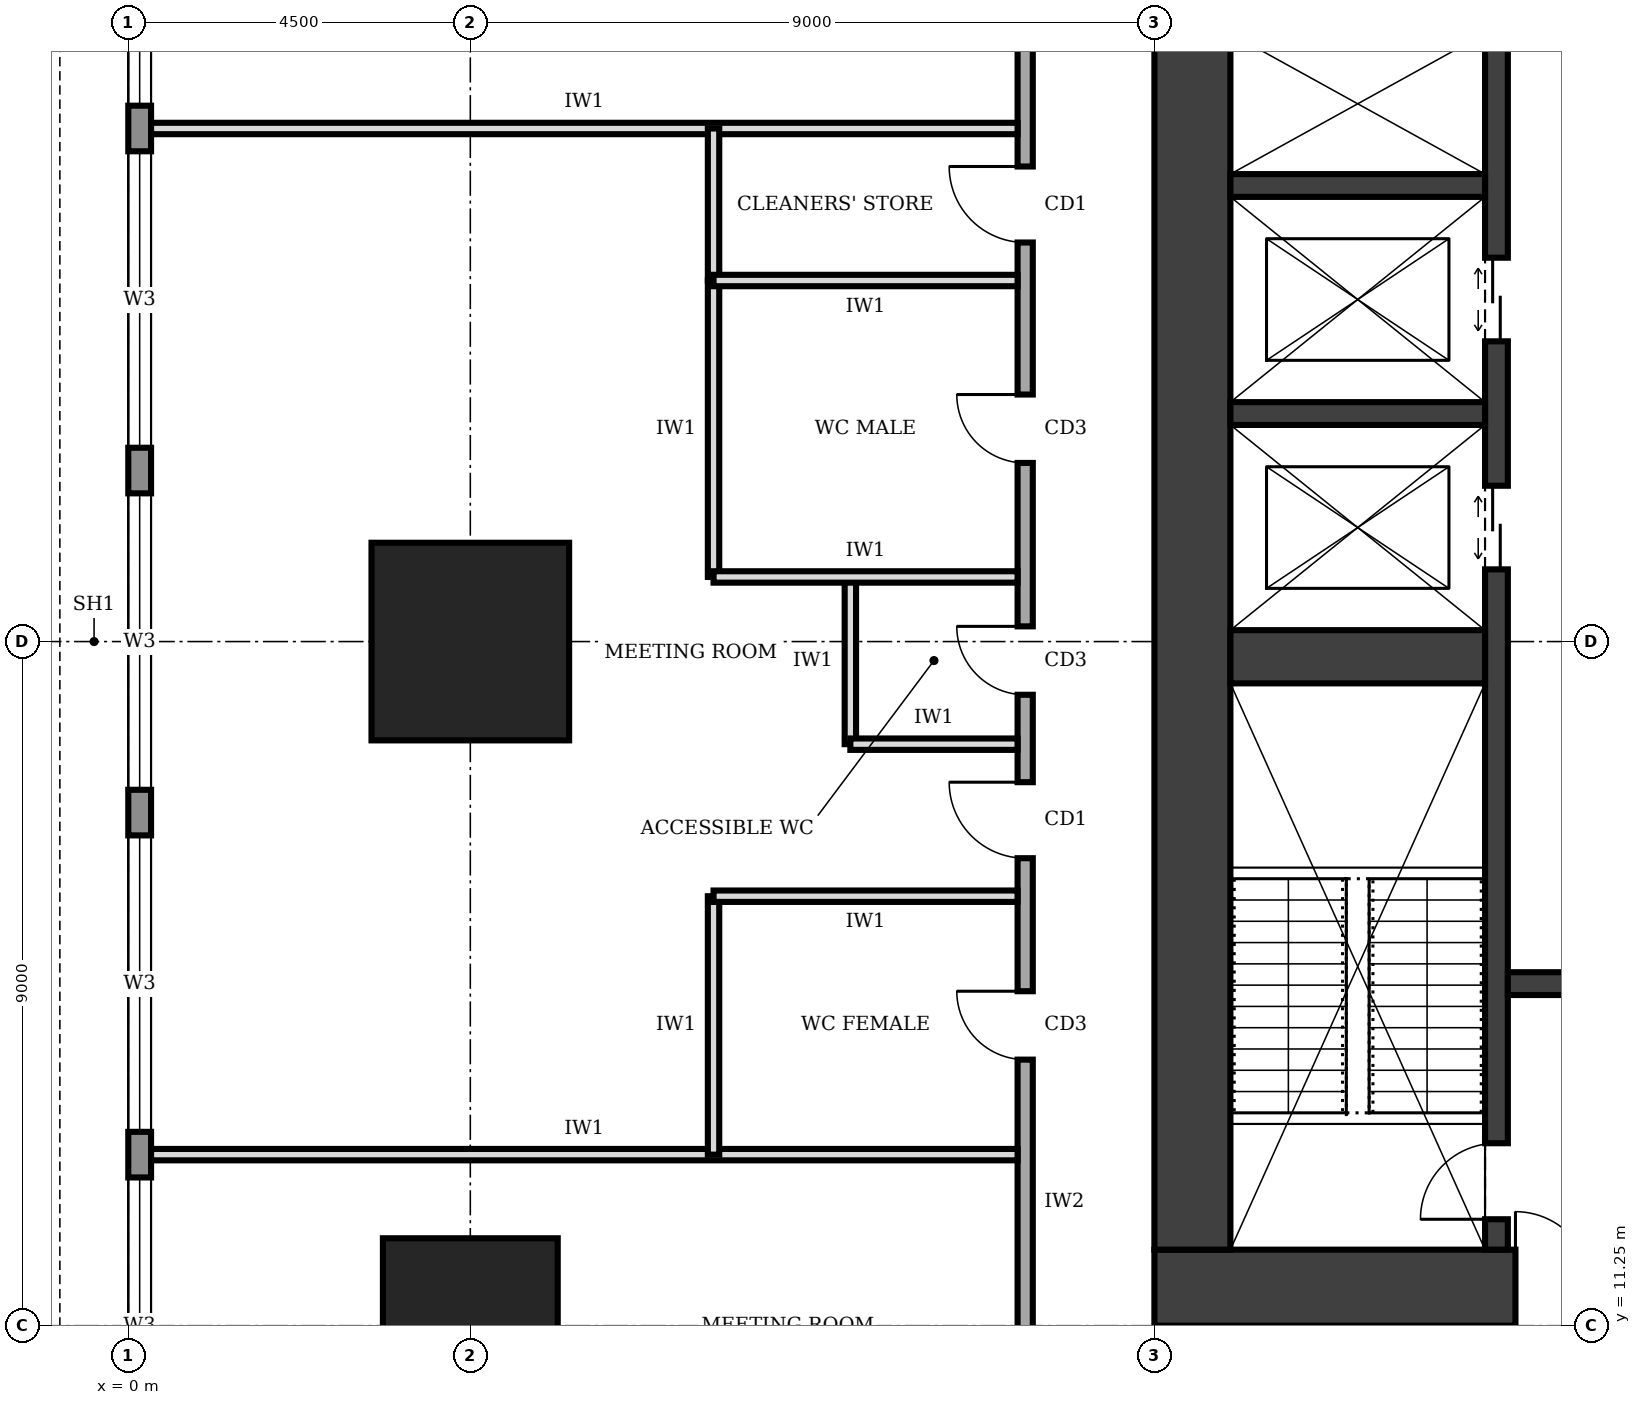
"""IFC4 building model, lengths in metres.
Left out: names, types, materials, properties, quantities, classifications, styles, units other than length and angle.
Written with IfcOpenShell. Run it as: python <this file> out.ifc"""

import sys

from ifc_helpers import new_model, si_unit, direction, frame, frame_2d, origin, origin_2d, place, context, subcontext, project, spatial, rectangle, extrude, element, fill, save


model = new_model("IFC4")
c1 = context("Model", 3, precision=1e-05, world=origin(), true_north=direction((0.0, 1.0)))
c2 = subcontext(c1, "Body", "Model", "MODEL_VIEW")
j1 = project(units=[si_unit("LENGTHUNIT", "METRE"), si_unit("PLANEANGLEUNIT", "RADIAN")], contexts=[c1])
p1 = place(None, origin())
s1 = spatial("IfcSite", under=j1, at=p1, CompositionType="ELEMENT")
p2 = place(p1, origin())
s2 = spatial("IfcBuilding", under=s1, at=p2, CompositionType="ELEMENT")
p3 = place(p2, frame((0.0, 0.0, 85.0)))
s3 = spatial("IfcBuildingStorey", under=s2, at=p3, CompositionType="ELEMENT", Elevation=85.0)
p4 = place(p3, frame((13.5, 11.75, 0.0), z_axis=(0.0, 0.0, 1.0), x_axis=(1.0, 0.0, 0.0)))
e1 = element("IfcWall", 1, at=p4, inside=s3, PredefinedType="SHEAR", context=c2, shape_type="SweptSolid", body=[
    extrude(rectangle(XDim=13.5, YDim=1.0, at=frame_2d((6.75, 0.0))), origin(), (0.0, 0.0, 1.0), 4.0),
])
p5 = place(p4, frame((4.75, 0.0, 0.0)))
e2 = element("IfcOpeningElement", 2, at=p5, cuts=e1, PredefinedType="OPENING", context=c2, shape_type="SweptSolid", body=[
    extrude(rectangle(XDim=1.0, YDim=2.1, at=frame_2d((0.5, 1.05))), frame((0.0, 0.51, 0.0), z_axis=(0.0, -1.0, 0.0), x_axis=(1.0, 0.0, 0.0)), (0.0, 0.0, 1.0), 1.02),
])
p6 = place(p3, frame((14.0, 28.25, 0.0), z_axis=(0.0, 0.0, 1.0), x_axis=(0.0, -1.0, 0.0)))
e3 = element("IfcWall", 3, at=p6, inside=s3, PredefinedType="SHEAR", context=c2, shape_type="SweptSolid", body=[
    extrude(rectangle(XDim=16.0, YDim=1.0, at=frame_2d((8.0, 0.0))), origin(), (0.0, 0.0, 1.0), 4.0),
])
p7 = place(p3, frame((18.0, 12.25, 0.0), z_axis=(0.0, 0.0, 1.0), x_axis=(0.0, 1.0, 0.0)))
e4 = element("IfcWall", 4, at=p7, inside=s3, PredefinedType="SHEAR", context=c2, shape_type="SweptSolid", body=[
    extrude(rectangle(XDim=16.0, YDim=0.3, at=frame_2d((8.0, 0.0))), origin(), (0.0, 0.0, 1.0), 4.0),
])
p8 = place(p7, frame((0.4, 0.0, 0.0)))
e5 = element("IfcOpeningElement", 5, at=p8, cuts=e4, PredefinedType="OPENING", context=c2, shape_type="SweptSolid", body=[
    extrude(rectangle(XDim=1.0, YDim=2.1, at=frame_2d((0.5, 1.05))), frame((0.0, 0.16, 0.0), z_axis=(0.0, -1.0, 0.0), x_axis=(1.0, 0.0, 0.0)), (0.0, 0.0, 1.0), 0.32),
])
p9 = place(p7, frame((8.95, 0.0, 0.0)))
e6 = element("IfcOpeningElement", 6, at=p9, cuts=e4, PredefinedType="OPENING", context=c2, shape_type="SweptSolid", body=[
    extrude(rectangle(XDim=1.1, YDim=2.1, at=frame_2d((0.55, 1.05))), frame((0.0, 0.16, 0.0), z_axis=(0.0, -1.0, 0.0), x_axis=(1.0, 0.0, 0.0)), (0.0, 0.0, 1.0), 0.32),
])
p10 = place(p7, frame((11.95, 0.0, 0.0)))
e7 = element("IfcOpeningElement", 7, at=p10, cuts=e4, PredefinedType="OPENING", context=c2, shape_type="SweptSolid", body=[
    extrude(rectangle(XDim=1.1, YDim=2.1, at=frame_2d((0.55, 1.05))), frame((0.0, 0.16, 0.0), z_axis=(0.0, -1.0, 0.0), x_axis=(1.0, 0.0, 0.0)), (0.0, 0.0, 1.0), 0.32),
])
p11 = place(p3, frame((14.5, 20.05, 0.0), z_axis=(0.0, 0.0, 1.0), x_axis=(1.0, 0.0, 0.0)))
e8 = element("IfcWall", 8, at=p11, inside=s3, PredefinedType="SHEAR", context=c2, shape_type="SweptSolid", body=[
    extrude(rectangle(XDim=3.35, YDim=0.7, at=frame_2d((1.675, 0.0))), origin(), (0.0, 0.0, 1.0), 4.0),
])
p12 = place(p3, frame((18.15, 15.75, 0.0), z_axis=(0.0, 0.0, 1.0), x_axis=(1.0, 0.0, 0.0)))
e9 = element("IfcWall", 9, at=p12, inside=s3, PredefinedType="SHEAR", context=c2, shape_type="SweptSolid", body=[
    extrude(rectangle(XDim=4.2, YDim=0.3, at=frame_2d((2.1, 0.0))), origin(), (0.0, 0.0, 1.0), 4.0),
])
p13 = place(p12, frame((1.6, 0.0, 0.0)))
e10 = element("IfcOpeningElement", 10, at=p13, cuts=e9, PredefinedType="OPENING", context=c2, shape_type="SweptSolid", body=[
    extrude(rectangle(XDim=1.0, YDim=2.1, at=frame_2d((0.5, 1.05))), frame((0.0, 0.16, 0.0), z_axis=(0.0, -1.0, 0.0), x_axis=(1.0, 0.0, 0.0)), (0.0, 0.0, 1.0), 0.32),
])
for number, where, z_axis, x_axis in (
    (11, (14.5, 23.25, 0.0), (0.0, 0.0, 1.0), (1.0, 0.0, 0.0)),
    (12, (14.5, 26.25, 0.0), (0.0, 0.0, 1.0), (1.0, 0.0, 0.0)),
):
    element("IfcWall", number, at=place(p3, frame(where, z_axis=z_axis, x_axis=x_axis)), inside=s3, PredefinedType="SHEAR", context=c2, shape_type="SweptSolid", body=[
        extrude(rectangle(XDim=3.35, YDim=0.3, at=frame_2d((1.675, 0.0))), origin(), (0.0, 0.0, 1.0), 4.0),
    ])
p14 = place(p3, frame((4.5, 11.25, 0.0), z_axis=(0.0, 0.0, 1.0), x_axis=(1.0, 0.0, 0.0)))
e13 = element("IfcColumn", 13, at=p14, inside=s3, PredefinedType="COLUMN", context=c2, shape_type="SweptSolid", body=[
    extrude(rectangle(XDim=2.3, YDim=2.3, at=origin_2d()), origin(), (0.0, 0.0, 1.0), 4.0),
])
p15 = place(p3, frame((4.5, 20.25, 0.0), z_axis=(0.0, 0.0, 1.0), x_axis=(1.0, 0.0, 0.0)))
e14 = element("IfcColumn", 14, at=p15, inside=s3, PredefinedType="COLUMN", context=c2, shape_type="SweptSolid", body=[
    extrude(rectangle(XDim=2.6, YDim=2.6, at=origin_2d()), origin(), (0.0, 0.0, 1.0), 4.0),
])
p16 = place(p3, frame((0.15, 35.98, 0.0), z_axis=(0.0, 0.0, 1.0), x_axis=(0.0, -1.0, 0.0)))
e15 = element("IfcWall", 15, at=p16, inside=s3, PredefinedType="STANDARD", context=c2, shape_type="SweptSolid", body=[
    extrude(rectangle(XDim=31.46, YDim=0.3, at=frame_2d((15.73, 0.0))), origin(), (0.0, 0.0, 1.0), 3.75),
])
p17 = place(p16, frame((27.28, 0.0, 0.95)))
e16 = element("IfcOpeningElement", 16, at=p17, cuts=e15, PredefinedType="OPENING", context=c2, shape_type="SweptSolid", body=[
    extrude(rectangle(XDim=3.9, YDim=1.8, at=frame_2d((1.95, 0.9))), frame((0.0, 0.16, 0.0), z_axis=(0.0, -1.0, 0.0), x_axis=(1.0, 0.0, 0.0)), (0.0, 0.0, 1.0), 0.32),
])
p18 = place(p16, frame((22.78, 0.0, 0.95)))
e17 = element("IfcOpeningElement", 17, at=p18, cuts=e15, PredefinedType="OPENING", context=c2, shape_type="SweptSolid", body=[
    extrude(rectangle(XDim=3.9, YDim=1.8, at=frame_2d((1.95, 0.9))), frame((0.0, 0.16, 0.0), z_axis=(0.0, -1.0, 0.0), x_axis=(1.0, 0.0, 0.0)), (0.0, 0.0, 1.0), 0.32),
])
p19 = place(p16, frame((18.28, 0.0, 0.95)))
e18 = element("IfcOpeningElement", 18, at=p19, cuts=e15, PredefinedType="OPENING", context=c2, shape_type="SweptSolid", body=[
    extrude(rectangle(XDim=3.9, YDim=1.8, at=frame_2d((1.95, 0.9))), frame((0.0, 0.16, 0.0), z_axis=(0.0, -1.0, 0.0), x_axis=(1.0, 0.0, 0.0)), (0.0, 0.0, 1.0), 0.32),
])
p20 = place(p16, frame((13.78, 0.0, 0.95)))
e19 = element("IfcOpeningElement", 19, at=p20, cuts=e15, PredefinedType="OPENING", context=c2, shape_type="SweptSolid", body=[
    extrude(rectangle(XDim=3.9, YDim=1.8, at=frame_2d((1.95, 0.9))), frame((0.0, 0.16, 0.0), z_axis=(0.0, -1.0, 0.0), x_axis=(1.0, 0.0, 0.0)), (0.0, 0.0, 1.0), 0.32),
])
p21 = place(p16, frame((9.28, 0.0, 0.95)))
e20 = element("IfcOpeningElement", 20, at=p21, cuts=e15, PredefinedType="OPENING", context=c2, shape_type="SweptSolid", body=[
    extrude(rectangle(XDim=3.9, YDim=1.8, at=frame_2d((1.95, 0.9))), frame((0.0, 0.16, 0.0), z_axis=(0.0, -1.0, 0.0), x_axis=(1.0, 0.0, 0.0)), (0.0, 0.0, 1.0), 0.32),
])
p22 = place(p16, frame((4.78, 0.0, 0.95)))
e21 = element("IfcOpeningElement", 21, at=p22, cuts=e15, PredefinedType="OPENING", context=c2, shape_type="SweptSolid", body=[
    extrude(rectangle(XDim=3.9, YDim=1.8, at=frame_2d((1.95, 0.9))), frame((0.0, 0.16, 0.0), z_axis=(0.0, -1.0, 0.0), x_axis=(1.0, 0.0, 0.0)), (0.0, 0.0, 1.0), 0.32),
])
p23 = place(p3, frame((11.8, 32.8, 0.0), z_axis=(0.0, 0.0, 1.0), x_axis=(0.0, -1.0, 0.0)))
e22 = element("IfcWall", 22, at=p23, inside=s3, PredefinedType="SOLIDWALL", context=c2, shape_type="SweptSolid", body=[
    extrude(rectangle(XDim=25.3, YDim=0.2, at=frame_2d((12.65, 0.0))), origin(), (0.0, 0.0, 1.0), 3.75),
])
p24 = place(p23, frame((21.8, 0.0, 0.0)))
e23 = element("IfcOpeningElement", 23, at=p24, cuts=e22, PredefinedType="OPENING", context=c2, shape_type="SweptSolid", body=[
    extrude(rectangle(XDim=1.0, YDim=2.1, at=frame_2d((0.5, 1.05))), frame((0.0, 0.11, 0.0), z_axis=(0.0, -1.0, 0.0), x_axis=(1.0, 0.0, 0.0)), (0.0, 0.0, 1.0), 0.22),
])
p25 = place(p23, frame((17.15, 0.0, 0.0)))
e24 = element("IfcOpeningElement", 24, at=p25, cuts=e22, PredefinedType="OPENING", context=c2, shape_type="SweptSolid", body=[
    extrude(rectangle(XDim=0.9, YDim=2.1, at=frame_2d((0.45, 1.05))), frame((0.0, 0.11, 0.0), z_axis=(0.0, -1.0, 0.0), x_axis=(1.0, 0.0, 0.0)), (0.0, 0.0, 1.0), 0.22),
])
p26 = place(p23, frame((12.35, 0.0, 0.0)))
e25 = element("IfcOpeningElement", 25, at=p26, cuts=e22, PredefinedType="OPENING", context=c2, shape_type="SweptSolid", body=[
    extrude(rectangle(XDim=0.9, YDim=2.1, at=frame_2d((0.45, 1.05))), frame((0.0, 0.11, 0.0), z_axis=(0.0, -1.0, 0.0), x_axis=(1.0, 0.0, 0.0)), (0.0, 0.0, 1.0), 0.22),
])
p27 = place(p23, frame((9.3, 0.0, 0.0)))
e26 = element("IfcOpeningElement", 26, at=p27, cuts=e22, PredefinedType="OPENING", context=c2, shape_type="SweptSolid", body=[
    extrude(rectangle(XDim=0.9, YDim=2.1, at=frame_2d((0.45, 1.05))), frame((0.0, 0.11, 0.0), z_axis=(0.0, -1.0, 0.0), x_axis=(1.0, 0.0, 0.0)), (0.0, 0.0, 1.0), 0.22),
])
p28 = place(p23, frame((6.3, 0.0, 0.0)))
e27 = element("IfcOpeningElement", 27, at=p28, cuts=e22, PredefinedType="OPENING", context=c2, shape_type="SweptSolid", body=[
    extrude(rectangle(XDim=1.0, YDim=2.1, at=frame_2d((0.5, 1.05))), frame((0.0, 0.11, 0.0), z_axis=(0.0, -1.0, 0.0), x_axis=(1.0, 0.0, 0.0)), (0.0, 0.0, 1.0), 0.22),
])
p29 = place(p23, frame((14.4, 0.0, 0.0)))
e28 = element("IfcOpeningElement", 28, at=p29, cuts=e22, PredefinedType="OPENING", context=c2, shape_type="SweptSolid", body=[
    extrude(rectangle(XDim=1.0, YDim=2.1, at=frame_2d((0.5, 1.05))), frame((0.0, 0.11, 0.0), z_axis=(0.0, -1.0, 0.0), x_axis=(1.0, 0.0, 0.0)), (0.0, 0.0, 1.0), 0.22),
])
p30 = place(p23, frame((2.3, 0.0, 0.0)))
e29 = element("IfcOpeningElement", 29, at=p30, cuts=e22, PredefinedType="OPENING", context=c2, shape_type="SweptSolid", body=[
    extrude(rectangle(XDim=1.0, YDim=2.1, at=frame_2d((0.5, 1.05))), frame((0.0, 0.11, 0.0), z_axis=(0.0, -1.0, 0.0), x_axis=(1.0, 0.0, 0.0)), (0.0, 0.0, 1.0), 0.22),
])
for number, where, z_axis, x_axis in (
    (30, (0.3, 13.5, 0.0), (0.0, 0.0, 1.0), (1.0, 0.0, 0.0)),
    (31, (0.3, 27.0, 0.0), (0.0, 0.0, 1.0), (1.0, 0.0, 0.0)),
):
    element("IfcWall", number, at=place(p3, frame(where, z_axis=z_axis, x_axis=x_axis)), inside=s3, PredefinedType="PARTITIONING", context=c2, shape_type="SweptSolid", body=[
        extrude(rectangle(XDim=11.4, YDim=0.15, at=frame_2d((5.7, 0.0))), origin(), (0.0, 0.0, 1.0), 3.75),
    ])
p31 = place(p3, frame((11.7, 16.9, 0.0), z_axis=(0.0, 0.0, 1.0), x_axis=(-1.0, 0.0, 0.0)))
e32 = element("IfcWall", 32, at=p31, inside=s3, PredefinedType="PARTITIONING", context=c2, shape_type="SweptSolid", body=[
    extrude(rectangle(XDim=4.0, YDim=0.15, at=frame_2d((2.0, 0.0))), origin(), (0.0, 0.0, 1.0), 3.75),
])
p32 = place(p3, frame((11.7, 18.9, 0.0), z_axis=(0.0, 0.0, 1.0), x_axis=(-1.0, 0.0, 0.0)))
e33 = element("IfcWall", 33, at=p32, inside=s3, PredefinedType="PARTITIONING", context=c2, shape_type="SweptSolid", body=[
    extrude(rectangle(XDim=2.2, YDim=0.15, at=frame_2d((1.1, 0.0))), origin(), (0.0, 0.0, 1.0), 3.75),
])
p33 = place(p3, frame((11.7, 21.1, 0.0), z_axis=(0.0, 0.0, 1.0), x_axis=(-1.0, 0.0, 0.0)))
e34 = element("IfcWall", 34, at=p33, inside=s3, PredefinedType="PARTITIONING", context=c2, shape_type="SweptSolid", body=[
    extrude(rectangle(XDim=4.0, YDim=0.15, at=frame_2d((2.0, 0.0))), origin(), (0.0, 0.0, 1.0), 2.85),
])
p34 = place(p3, frame((11.7, 25.0, 0.0), z_axis=(0.0, 0.0, 1.0), x_axis=(-1.0, 0.0, 0.0)))
e35 = element("IfcWall", 35, at=p34, inside=s3, PredefinedType="PARTITIONING", context=c2, shape_type="SweptSolid", body=[
    extrude(rectangle(XDim=4.0, YDim=0.15, at=frame_2d((2.0, 0.0))), origin(), (0.0, 0.0, 1.0), 3.75),
])
p35 = place(p3, frame((7.7, 13.5, 0.0), z_axis=(0.0, 0.0, 1.0), x_axis=(0.0, 1.0, 0.0)))
e36 = element("IfcWall", 36, at=p35, inside=s3, PredefinedType="PARTITIONING", context=c2, shape_type="SweptSolid", body=[
    extrude(rectangle(XDim=3.4, YDim=0.15, at=frame_2d((1.7, 0.0))), origin(), (0.0, 0.0, 1.0), 3.75),
])
p36 = place(p3, frame((9.5, 18.9, 0.0), z_axis=(0.0, 0.0, 1.0), x_axis=(0.0, 1.0, 0.0)))
e37 = element("IfcWall", 37, at=p36, inside=s3, PredefinedType="PARTITIONING", context=c2, shape_type="SweptSolid", body=[
    extrude(rectangle(XDim=2.2, YDim=0.15, at=frame_2d((1.1, 0.0))), origin(), (0.0, 0.0, 1.0), 3.75),
])
p37 = place(p3, frame((7.7, 21.1, 0.0), z_axis=(0.0, 0.0, 1.0), x_axis=(0.0, 1.0, 0.0)))
e38 = element("IfcWall", 38, at=p37, inside=s3, PredefinedType="PARTITIONING", context=c2, shape_type="SweptSolid", body=[
    extrude(rectangle(XDim=3.9, YDim=0.15, at=frame_2d((1.95, 0.0))), origin(), (0.0, 0.0, 1.0), 3.75),
])
p38 = place(p3, frame((7.7, 25.0, 0.0), z_axis=(0.0, 0.0, 1.0), x_axis=(0.0, 1.0, 0.0)))
e39 = element("IfcWall", 39, at=p38, inside=s3, PredefinedType="PARTITIONING", context=c2, shape_type="SweptSolid", body=[
    extrude(rectangle(XDim=2.0, YDim=0.15, at=frame_2d((1.0, 0.0))), origin(), (0.0, 0.0, 1.0), 3.75),
])
p39 = place(p18, origin())
e40 = element("IfcWindow", 40, at=p39, inside=s3, PartitioningType="SINGLE_PANEL", PredefinedType="WINDOW", context=c2, shape_type="SweptSolid", body=[
    extrude(rectangle(XDim=3.9, YDim=1.8, at=frame_2d((1.95, 0.9))), frame((0.0, 0.03, 0.0), z_axis=(0.0, -1.0, 0.0), x_axis=(1.0, 0.0, 0.0)), (0.0, 0.0, 1.0), 0.06),
])
fill(e17, e40)
p40 = place(p19, origin())
e41 = element("IfcWindow", 41, at=p40, inside=s3, PartitioningType="SINGLE_PANEL", PredefinedType="WINDOW", context=c2, shape_type="SweptSolid", body=[
    extrude(rectangle(XDim=3.9, YDim=1.8, at=frame_2d((1.95, 0.9))), frame((0.0, 0.03, 0.0), z_axis=(0.0, -1.0, 0.0), x_axis=(1.0, 0.0, 0.0)), (0.0, 0.0, 1.0), 0.06),
])
fill(e18, e41)
p41 = place(p20, origin())
e42 = element("IfcWindow", 42, at=p41, inside=s3, PartitioningType="SINGLE_PANEL", PredefinedType="WINDOW", context=c2, shape_type="SweptSolid", body=[
    extrude(rectangle(XDim=3.9, YDim=1.8, at=frame_2d((1.95, 0.9))), frame((0.0, 0.03, 0.0), z_axis=(0.0, -1.0, 0.0), x_axis=(1.0, 0.0, 0.0)), (0.0, 0.0, 1.0), 0.06),
])
fill(e19, e42)
p42 = place(p21, origin())
e43 = element("IfcWindow", 43, at=p42, inside=s3, PartitioningType="SINGLE_PANEL", PredefinedType="WINDOW", context=c2, shape_type="SweptSolid", body=[
    extrude(rectangle(XDim=3.9, YDim=1.8, at=frame_2d((1.95, 0.9))), frame((0.0, 0.03, 0.0), z_axis=(0.0, -1.0, 0.0), x_axis=(1.0, 0.0, 0.0)), (0.0, 0.0, 1.0), 0.06),
])
fill(e20, e43)
p43 = place(p22, origin())
e44 = element("IfcWindow", 44, at=p43, inside=s3, PartitioningType="SINGLE_PANEL", PredefinedType="WINDOW", context=c2, shape_type="SweptSolid", body=[
    extrude(rectangle(XDim=3.9, YDim=1.8, at=frame_2d((1.95, 0.9))), frame((0.0, 0.03, 0.0), z_axis=(0.0, -1.0, 0.0), x_axis=(1.0, 0.0, 0.0)), (0.0, 0.0, 1.0), 0.06),
])
fill(e21, e44)
p44 = place(p5, origin())
e45 = element("IfcDoor", 45, at=p44, inside=s3, OperationType="SINGLE_SWING_LEFT", PredefinedType="DOOR", context=c2, shape_type="SweptSolid", body=[
    extrude(rectangle(XDim=1.0, YDim=2.1, at=frame_2d((0.5, 1.05))), frame((0.0, 0.025, 0.0), z_axis=(0.0, -1.0, 0.0), x_axis=(1.0, 0.0, 0.0)), (0.0, 0.0, 1.0), 0.05),
])
fill(e2, e45)
p45 = place(p8, origin())
e46 = element("IfcDoor", 46, at=p45, inside=s3, OperationType="SINGLE_SWING_LEFT", PredefinedType="DOOR", context=c2, shape_type="SweptSolid", body=[
    extrude(rectangle(XDim=1.0, YDim=2.1, at=frame_2d((0.5, 1.05))), frame((0.0, 0.025, 0.0), z_axis=(0.0, -1.0, 0.0), x_axis=(1.0, 0.0, 0.0)), (0.0, 0.0, 1.0), 0.05),
])
fill(e5, e46)
p46 = place(p9, origin())
e47 = element("IfcDoor", 47, at=p46, inside=s3, OperationType="DOUBLE_DOOR_SLIDING", PredefinedType="DOOR", context=c2, shape_type="SweptSolid", body=[
    extrude(rectangle(XDim=1.1, YDim=2.1, at=frame_2d((0.55, 1.05))), frame((0.0, 0.025, 0.0), z_axis=(0.0, -1.0, 0.0), x_axis=(1.0, 0.0, 0.0)), (0.0, 0.0, 1.0), 0.05),
])
fill(e6, e47)
p47 = place(p10, origin())
e48 = element("IfcDoor", 48, at=p47, inside=s3, OperationType="DOUBLE_DOOR_SLIDING", PredefinedType="DOOR", context=c2, shape_type="SweptSolid", body=[
    extrude(rectangle(XDim=1.1, YDim=2.1, at=frame_2d((0.55, 1.05))), frame((0.0, 0.025, 0.0), z_axis=(0.0, -1.0, 0.0), x_axis=(1.0, 0.0, 0.0)), (0.0, 0.0, 1.0), 0.05),
])
fill(e7, e48)
p48 = place(p25, frame((0.9, 0.0, 0.0), z_axis=(0.0, 0.0, 1.0), x_axis=(-1.0, 0.0, 0.0)))
e49 = element("IfcDoor", 49, at=p48, inside=s3, OperationType="SINGLE_SWING_RIGHT", PredefinedType="DOOR", context=c2, shape_type="SweptSolid", body=[
    extrude(rectangle(XDim=0.9, YDim=2.1, at=frame_2d((0.45, 1.05))), frame((0.0, 0.025, 0.0), z_axis=(0.0, -1.0, 0.0), x_axis=(1.0, 0.0, 0.0)), (0.0, 0.0, 1.0), 0.05),
])
fill(e24, e49)
p49 = place(p26, frame((0.9, 0.0, 0.0), z_axis=(0.0, 0.0, 1.0), x_axis=(-1.0, 0.0, 0.0)))
e50 = element("IfcDoor", 50, at=p49, inside=s3, OperationType="SINGLE_SWING_RIGHT", PredefinedType="DOOR", context=c2, shape_type="SweptSolid", body=[
    extrude(rectangle(XDim=0.9, YDim=2.1, at=frame_2d((0.45, 1.05))), frame((0.0, 0.025, 0.0), z_axis=(0.0, -1.0, 0.0), x_axis=(1.0, 0.0, 0.0)), (0.0, 0.0, 1.0), 0.05),
])
fill(e25, e50)
p50 = place(p27, frame((0.9, 0.0, 0.0), z_axis=(0.0, 0.0, 1.0), x_axis=(-1.0, 0.0, 0.0)))
e51 = element("IfcDoor", 51, at=p50, inside=s3, OperationType="SINGLE_SWING_RIGHT", PredefinedType="DOOR", context=c2, shape_type="SweptSolid", body=[
    extrude(rectangle(XDim=0.9, YDim=2.1, at=frame_2d((0.45, 1.05))), frame((0.0, 0.025, 0.0), z_axis=(0.0, -1.0, 0.0), x_axis=(1.0, 0.0, 0.0)), (0.0, 0.0, 1.0), 0.05),
])
fill(e26, e51)
p51 = place(p28, frame((1.0, 0.0, 0.0), z_axis=(0.0, 0.0, 1.0), x_axis=(-1.0, 0.0, 0.0)))
e52 = element("IfcDoor", 52, at=p51, inside=s3, OperationType="SINGLE_SWING_RIGHT", PredefinedType="DOOR", context=c2, shape_type="SweptSolid", body=[
    extrude(rectangle(XDim=1.0, YDim=2.1, at=frame_2d((0.5, 1.05))), frame((0.0, 0.025, 0.0), z_axis=(0.0, -1.0, 0.0), x_axis=(1.0, 0.0, 0.0)), (0.0, 0.0, 1.0), 0.05),
])
fill(e27, e52)
p52 = place(p29, frame((1.0, 0.0, 0.0), z_axis=(0.0, 0.0, 1.0), x_axis=(-1.0, 0.0, 0.0)))
e53 = element("IfcDoor", 53, at=p52, inside=s3, OperationType="SINGLE_SWING_RIGHT", PredefinedType="DOOR", context=c2, shape_type="SweptSolid", body=[
    extrude(rectangle(XDim=1.0, YDim=2.1, at=frame_2d((0.5, 1.05))), frame((0.0, 0.025, 0.0), z_axis=(0.0, -1.0, 0.0), x_axis=(1.0, 0.0, 0.0)), (0.0, 0.0, 1.0), 0.05),
])
fill(e28, e53)
save(model, sys.argv[1])
